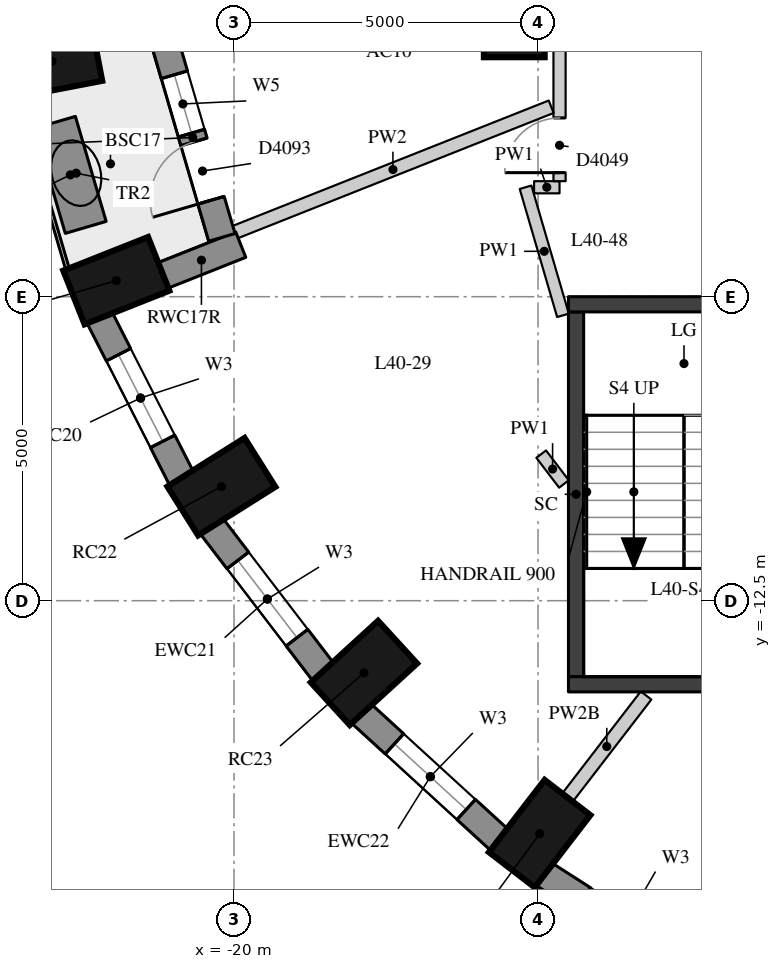
"""IFC4 building model, lengths in metres.
Left out: names, types, materials, properties, quantities, classifications, styles, units other than length and angle.
Written with IfcOpenShell. Run it as: python <this file> out.ifc"""

import sys

from ifc_helpers import new_model, si_unit, direction, frame, frame_2d, origin, origin_2d, place, context, subcontext, project, spatial, rectangle, extrude, element, fill, save


model = new_model("IFC4")
c1 = context("Model", 3, precision=1e-05, world=origin(), true_north=direction((0.0, 1.0)))
c2 = subcontext(c1, "Body", "Model", "MODEL_VIEW")
j1 = project(units=[si_unit("LENGTHUNIT", "METRE"), si_unit("PLANEANGLEUNIT", "RADIAN")], contexts=[c1])
p1 = place(None, origin())
s1 = spatial("IfcSite", under=j1, at=p1, CompositionType="ELEMENT")
p2 = place(p1, origin())
s2 = spatial("IfcBuilding", under=s1, at=p2, CompositionType="ELEMENT")
p3 = place(p2, frame((0.0, 0.0, 145.1)))
s3 = spatial("IfcBuildingStorey", under=s2, at=p3, CompositionType="ELEMENT", Elevation=145.1)
for number, where, z_axis, x_axis in (
    (1, (-22.994, -3.625, 0.0), (0.0, 0.0, 1.0), (-0.982, -0.189, 0.0)),
    (2, (-21.936, -7.236, 0.0), (0.0, 0.0, 1.0), (-0.93, -0.369, 0.0)),
    (3, (-20.208, -10.625, 0.0), (0.0, 0.0, 1.0), (-0.846, -0.533, 0.0)),
    (4, (-17.864, -13.688, 0.0), (0.0, 0.0, 1.0), (-0.738, -0.675, 0.0)),
    (5, (-14.973, -16.332, 0.0), (0.0, 0.0, 1.0), (-0.61, -0.792, 0.0)),
):
    element("IfcColumn", number, at=place(p3, frame(where, z_axis=z_axis, x_axis=x_axis)), inside=s3, PredefinedType="COLUMN", context=c2, shape_type="SweptSolid", body=[
        extrude(rectangle(XDim=1.5, YDim=0.95, at=origin_2d()), origin(), (0.0, 0.0, 1.0), 3.3),
    ])
p4 = place(p3, frame((-15.391, -3.062, 0.0), z_axis=(0.0, 0.0, 1.0), x_axis=(1.0, 0.0, 0.0)))
e6 = element("IfcColumn", 6, at=p4, inside=s3, PredefinedType="COLUMN", context=c2, shape_type="SweptSolid", body=[
    extrude(rectangle(XDim=1.0, YDim=1.0, at=origin_2d()), origin(), (0.0, 0.0, 1.0), 3.3),
])
p5 = place(p3, frame((-22.215, -7.837, 0.0), z_axis=(0.0, 0.0, 1.0), x_axis=(0.454133999889, -0.890933392653, 0.0)))
e7 = element("IfcWall", 7, at=p5, inside=s3, PredefinedType="SOLIDWALL", context=c2, shape_type="SweptSolid", body=[
    extrude(rectangle(XDim=2.986, YDim=0.45, at=frame_2d((1.493, 0.0))), origin(), (0.0, 0.0, 1.0), 3.02),
])
p6 = place(p5, frame((0.693, 0.0, 0.4)))
e8 = element("IfcOpeningElement", 8, at=p6, cuts=e7, PredefinedType="OPENING", context=c2, shape_type="SweptSolid", body=[
    extrude(rectangle(XDim=1.6, YDim=1.75, at=frame_2d((0.8, 0.875))), frame((0.0, 0.235, 0.0), z_axis=(0.0, -1.0, 0.0), x_axis=(1.0, 0.0, 0.0)), (0.0, 0.0, 1.0), 0.47),
])
p7 = place(p3, frame((-20.374, -11.267, 0.0), z_axis=(0.0, 0.0, 1.0), x_axis=(0.607817056371, -0.794077090706, 0.0)))
e9 = element("IfcWall", 9, at=p7, inside=s3, PredefinedType="SOLIDWALL", context=c2, shape_type="SweptSolid", body=[
    extrude(rectangle(XDim=3.037, YDim=0.45, at=frame_2d((1.519, 0.0))), origin(), (0.0, 0.0, 1.0), 3.02),
])
p8 = place(p7, frame((0.719, 0.0, 0.4)))
e10 = element("IfcOpeningElement", 10, at=p8, cuts=e9, PredefinedType="OPENING", context=c2, shape_type="SweptSolid", body=[
    extrude(rectangle(XDim=1.6, YDim=1.75, at=frame_2d((0.8, 0.875))), frame((0.0, 0.235, 0.0), z_axis=(0.0, -1.0, 0.0), x_axis=(1.0, 0.0, 0.0)), (0.0, 0.0, 1.0), 0.47),
])
p9 = place(p3, frame((-17.913, -14.35, 0.0), z_axis=(0.0, 0.0, 1.0), x_axis=(0.737808755941, -0.675009807082, 0.0)))
e11 = element("IfcWall", 11, at=p9, inside=s3, PredefinedType="SOLIDWALL", context=c2, shape_type="SweptSolid", body=[
    extrude(rectangle(XDim=3.094, YDim=0.45, at=frame_2d((1.547, 0.0))), origin(), (0.0, 0.0, 1.0), 3.02),
])
p10 = place(p9, frame((0.747, 0.0, 0.4)))
e12 = element("IfcOpeningElement", 12, at=p10, cuts=e11, PredefinedType="OPENING", context=c2, shape_type="SweptSolid", body=[
    extrude(rectangle(XDim=1.6, YDim=1.75, at=frame_2d((0.8, 0.875))), frame((0.0, 0.235, 0.0), z_axis=(0.0, -1.0, 0.0), x_axis=(1.0, 0.0, 0.0)), (0.0, 0.0, 1.0), 0.47),
])
p11 = place(p3, frame((-14.908, -16.993, 0.0), z_axis=(0.0, 0.0, 1.0), x_axis=(0.842065914439, -0.539374633943, 0.0)))
e13 = element("IfcWall", 13, at=p11, inside=s3, PredefinedType="SOLIDWALL", context=c2, shape_type="SweptSolid", body=[
    extrude(rectangle(XDim=3.151, YDim=0.45, at=frame_2d((1.576, 0.0))), origin(), (0.0, 0.0, 1.0), 3.02),
])
p12 = place(p11, frame((0.776, 0.0, 0.4)))
e14 = element("IfcOpeningElement", 14, at=p12, cuts=e13, PredefinedType="OPENING", context=c2, shape_type="SweptSolid", body=[
    extrude(rectangle(XDim=1.6, YDim=1.75, at=frame_2d((0.8, 0.875))), frame((0.0, 0.235, 0.0), z_axis=(0.0, -1.0, 0.0), x_axis=(1.0, 0.0, 0.0)), (0.0, 0.0, 1.0), 0.47),
])
p13 = place(p3, frame((-21.182, -7.156, 0.0), z_axis=(0.0, 0.0, 1.0), x_axis=(0.929514600716, 0.368785312961, 0.0)))
e15 = element("IfcWall", 15, at=p13, inside=s3, PredefinedType="SOLIDWALL", context=c2, shape_type="SweptSolid", body=[
    extrude(rectangle(XDim=1.39, YDim=0.45, at=frame_2d((0.695, 0.0))), origin(), (0.0, 0.0, 1.0), 3.02),
])
p14 = place(p3, frame((-21.159, -3.239, 0.0), z_axis=(0.0, 0.0, 1.0), x_axis=(0.280377942886, -0.959889685924, 0.0)))
e16 = element("IfcWall", 16, at=p14, inside=s3, PredefinedType="SOLIDWALL", context=c2, shape_type="SweptSolid", body=[
    extrude(rectangle(XDim=3.423, YDim=0.45, at=frame_2d((1.711, 0.0))), origin(), (0.0, 0.0, 1.0), 3.02),
])
p15 = place(p14, frame((0.636, 0.0, 0.4)))
e17 = element("IfcOpeningElement", 17, at=p15, cuts=e16, PredefinedType="OPENING", context=c2, shape_type="SweptSolid", body=[
    extrude(rectangle(XDim=1.0, YDim=1.75, at=frame_2d((0.5, 0.875))), frame((0.0, 0.235, 0.0), z_axis=(0.0, -1.0, 0.0), x_axis=(1.0, 0.0, 0.0)), (0.0, 0.0, 1.0), 0.47),
])
p16 = place(p14, frame((1.786, 0.0, 0.0)))
e18 = element("IfcOpeningElement", 18, at=p16, cuts=e16, PredefinedType="OPENING", context=c2, shape_type="SweptSolid", body=[
    extrude(rectangle(XDim=1.0, YDim=2.15, at=frame_2d((0.5, 1.075))), frame((0.0, 0.235, 0.0), z_axis=(0.0, -1.0, 0.0), x_axis=(1.0, 0.0, 0.0)), (0.0, 0.0, 1.0), 0.47),
])
p17 = place(p3, frame((-22.945, -4.633, 0.0), z_axis=(0.0, 0.0, 1.0), x_axis=(0.28102063016, -0.959701727322, 0.0)))
e19 = element("IfcWall", 19, at=p17, inside=s3, PredefinedType="USERDEFINED", context=c2, shape_type="SweptSolid", body=[
    extrude(rectangle(XDim=1.8, YDim=0.7, at=frame_2d((0.9, 0.0))), origin(), (0.0, 0.0, 1.0), 0.75),
])
p18 = place(p3, frame((-14.375, -13.75, -0.28), z_axis=(0.0, 0.0, 1.0), x_axis=(0.0, 1.0, 0.0)))
e20 = element("IfcWall", 20, at=p18, inside=s3, PredefinedType="SHEAR", context=c2, shape_type="SweptSolid", body=[
    extrude(rectangle(XDim=6.0, YDim=0.25, at=frame_2d((3.0, 0.0))), origin(), (0.0, 0.0, 1.0), 3.3),
])
for number, where, z_axis, x_axis in (
    (21, (-14.5, -7.625, -0.28), (0.0, 0.0, 1.0), (1.0, 0.0, 0.0)),
    (22, (-14.5, -13.875, -0.28), (0.0, 0.0, 1.0), (1.0, 0.0, 0.0)),
):
    element("IfcWall", number, at=place(p3, frame(where, z_axis=z_axis, x_axis=x_axis)), inside=s3, PredefinedType="SHEAR", context=c2, shape_type="SweptSolid", body=[
        extrude(rectangle(XDim=5.2, YDim=0.25, at=frame_2d((2.6, 0.0))), origin(), (0.0, 0.0, 1.0), 3.3),
    ])
p19 = place(p3, frame((-14.574, -10.58, 0.0), z_axis=(0.0, 0.0, 1.0), x_axis=(-0.606745625174, 0.794896060081, 0.0)))
e23 = element("IfcWall", 23, at=p19, inside=s3, PredefinedType="PARTITIONING", context=c2, shape_type="SweptSolid", body=[
    extrude(rectangle(XDim=0.618, YDim=0.2, at=frame_2d((0.309, 0.0))), origin(), (0.0, 0.0, 1.0), 3.02),
])
p20 = place(p3, frame((-14.59, -7.807, 0.0), z_axis=(0.0, 0.0, 1.0), x_axis=(-0.280401457903, 0.959882817018, 0.0)))
e24 = element("IfcWall", 24, at=p20, inside=s3, PredefinedType="PARTITIONING", context=c2, shape_type="SweptSolid", body=[
    extrude(rectangle(XDim=2.195, YDim=0.2, at=frame_2d((1.098, 0.0))), origin(), (0.0, 0.0, 1.0), 3.02),
])
p21 = place(p3, frame((-15.065, -5.7, 0.0), z_axis=(0.0, 0.0, 1.0), x_axis=(1.0, 0.0, 0.0)))
e25 = element("IfcWall", 25, at=p21, inside=s3, PredefinedType="PARTITIONING", context=c2, shape_type="SweptSolid", body=[
    extrude(rectangle(XDim=0.419, YDim=0.2, at=frame_2d((0.209, 0.0))), origin(), (0.0, 0.0, 1.0), 3.02),
])
p22 = place(p3, frame((-14.647, -5.6, 0.0), z_axis=(0.0, 0.0, 1.0), x_axis=(0.0, 1.0, 0.0)))
e26 = element("IfcWall", 26, at=p22, inside=s3, PredefinedType="PARTITIONING", context=c2, shape_type="SweptSolid", body=[
    extrude(rectangle(XDim=11.3, YDim=0.2, at=frame_2d((5.65, 0.0))), origin(), (0.0, 0.0, 1.0), 3.02),
])
p23 = place(p22, frame((10.06, 0.0, 0.0)))
e27 = element("IfcOpeningElement", 27, at=p23, cuts=e26, PredefinedType="OPENING", context=c2, shape_type="SweptSolid", body=[
    extrude(rectangle(XDim=1.1, YDim=2.1, at=frame_2d((0.55, 1.05))), frame((0.0, 0.11, 0.0), z_axis=(0.0, -1.0, 0.0), x_axis=(1.0, 0.0, 0.0)), (0.0, 0.0, 1.0), 0.22),
])
p24 = place(p22, frame((3.639, 0.0, 0.0)))
e28 = element("IfcOpeningElement", 28, at=p24, cuts=e26, PredefinedType="OPENING", context=c2, shape_type="SweptSolid", body=[
    extrude(rectangle(XDim=1.2, YDim=2.1, at=frame_2d((0.6, 1.05))), frame((0.0, 0.11, 0.0), z_axis=(0.0, -1.0, 0.0), x_axis=(1.0, 0.0, 0.0)), (0.0, 0.0, 1.0), 0.22),
])
p25 = place(p22, frame((0.14, 0.0, 0.0)))
e29 = element("IfcOpeningElement", 29, at=p25, cuts=e26, PredefinedType="OPENING", context=c2, shape_type="SweptSolid", body=[
    extrude(rectangle(XDim=0.9, YDim=2.1, at=frame_2d((0.45, 1.05))), frame((0.0, 0.11, 0.0), z_axis=(0.0, -1.0, 0.0), x_axis=(1.0, 0.0, 0.0)), (0.0, 0.0, 1.0), 0.22),
])
p26 = place(p3, frame((-19.99, -6.441, 0.0), z_axis=(0.0, 0.0, 1.0), x_axis=(0.929507316491, 0.368803672147, 0.0)))
e30 = element("IfcWall", 30, at=p26, inside=s3, PredefinedType="PARTITIONING", context=c2, shape_type="SweptSolid", body=[
    extrude(rectangle(XDim=5.6, YDim=0.22, at=frame_2d((2.8, 0.0))), origin(), (0.0, 0.0, 1.0), 3.02),
])
p27 = place(p3, frame((-14.516, -15.737, 0.0), z_axis=(0.0, 0.0, 1.0), x_axis=(0.609983624648, 0.792414019097, 0.0)))
e31 = element("IfcWall", 31, at=p27, inside=s3, PredefinedType="PARTITIONING", context=c2, shape_type="SweptSolid", body=[
    extrude(rectangle(XDim=2.118, YDim=0.22, at=frame_2d((1.059, 0.0))), origin(), (0.0, 0.0, 1.0), 2.57),
])
p28 = place(p3, frame((-11.927, -3.927, 0.0), z_axis=(0.0, 0.0, 1.0), x_axis=(-0.382730523909, 0.923860025149, 0.0)))
e32 = element("IfcWall", 32, at=p28, inside=s3, PredefinedType="PARTITIONING", context=c2, shape_type="SweptSolid", body=[
    extrude(rectangle(XDim=4.251, YDim=0.1, at=frame_2d((2.125, 0.0))), origin(), (0.0, 0.0, 1.0), 3.02),
])
p29 = place(p6, origin())
e33 = element("IfcWindow", 33, at=p29, inside=s3, PartitioningType="SINGLE_PANEL", PredefinedType="WINDOW", context=c2, shape_type="SweptSolid", body=[
    extrude(rectangle(XDim=1.6, YDim=1.75, at=frame_2d((0.8, 0.875))), frame((0.0, 0.035, 0.0), z_axis=(0.0, -1.0, 0.0), x_axis=(1.0, 0.0, 0.0)), (0.0, 0.0, 1.0), 0.06),
])
fill(e8, e33)
p30 = place(p8, origin())
e34 = element("IfcWindow", 34, at=p30, inside=s3, PartitioningType="SINGLE_PANEL", PredefinedType="WINDOW", context=c2, shape_type="SweptSolid", body=[
    extrude(rectangle(XDim=1.6, YDim=1.75, at=frame_2d((0.8, 0.875))), frame((0.0, 0.035, 0.0), z_axis=(0.0, -1.0, 0.0), x_axis=(1.0, 0.0, 0.0)), (0.0, 0.0, 1.0), 0.06),
])
fill(e10, e34)
p31 = place(p10, origin())
e35 = element("IfcWindow", 35, at=p31, inside=s3, PartitioningType="SINGLE_PANEL", PredefinedType="WINDOW", context=c2, shape_type="SweptSolid", body=[
    extrude(rectangle(XDim=1.6, YDim=1.75, at=frame_2d((0.8, 0.875))), frame((0.0, 0.035, 0.0), z_axis=(0.0, -1.0, 0.0), x_axis=(1.0, 0.0, 0.0)), (0.0, 0.0, 1.0), 0.06),
])
fill(e12, e35)
p32 = place(p15, origin())
e36 = element("IfcWindow", 36, at=p32, inside=s3, PartitioningType="SINGLE_PANEL", PredefinedType="WINDOW", context=c2, shape_type="SweptSolid", body=[
    extrude(rectangle(XDim=1.0, YDim=1.75, at=frame_2d((0.5, 0.875))), frame((0.0, 0.035, 0.0), z_axis=(0.0, -1.0, 0.0), x_axis=(1.0, 0.0, 0.0)), (0.0, 0.0, 1.0), 0.06),
])
fill(e17, e36)
p33 = place(p16, frame((1.0, 0.0, 0.0), z_axis=(0.0, 0.0, 1.0), x_axis=(-1.0, 0.0, 0.0)))
e37 = element("IfcDoor", 37, at=p33, inside=s3, OperationType="SINGLE_SWING_LEFT", PredefinedType="DOOR", context=c2, shape_type="SweptSolid", body=[
    extrude(rectangle(XDim=1.0, YDim=2.15, at=frame_2d((0.5, 1.075))), frame((0.0, 0.075, 0.0), z_axis=(0.0, -1.0, 0.0), x_axis=(1.0, 0.0, 0.0)), (0.0, 0.0, 1.0), 0.05),
])
fill(e18, e37)
p34 = place(p25, origin())
e38 = element("IfcDoor", 38, at=p34, inside=s3, OperationType="SINGLE_SWING_LEFT", PredefinedType="DOOR", context=c2, shape_type="SweptSolid", body=[
    extrude(rectangle(XDim=0.9, YDim=2.1, at=frame_2d((0.45, 1.05))), frame((0.0, 0.025, 0.0), z_axis=(0.0, -1.0, 0.0), x_axis=(1.0, 0.0, 0.0)), (0.0, 0.0, 1.0), 0.05),
])
fill(e29, e38)
save(model, sys.argv[1])
